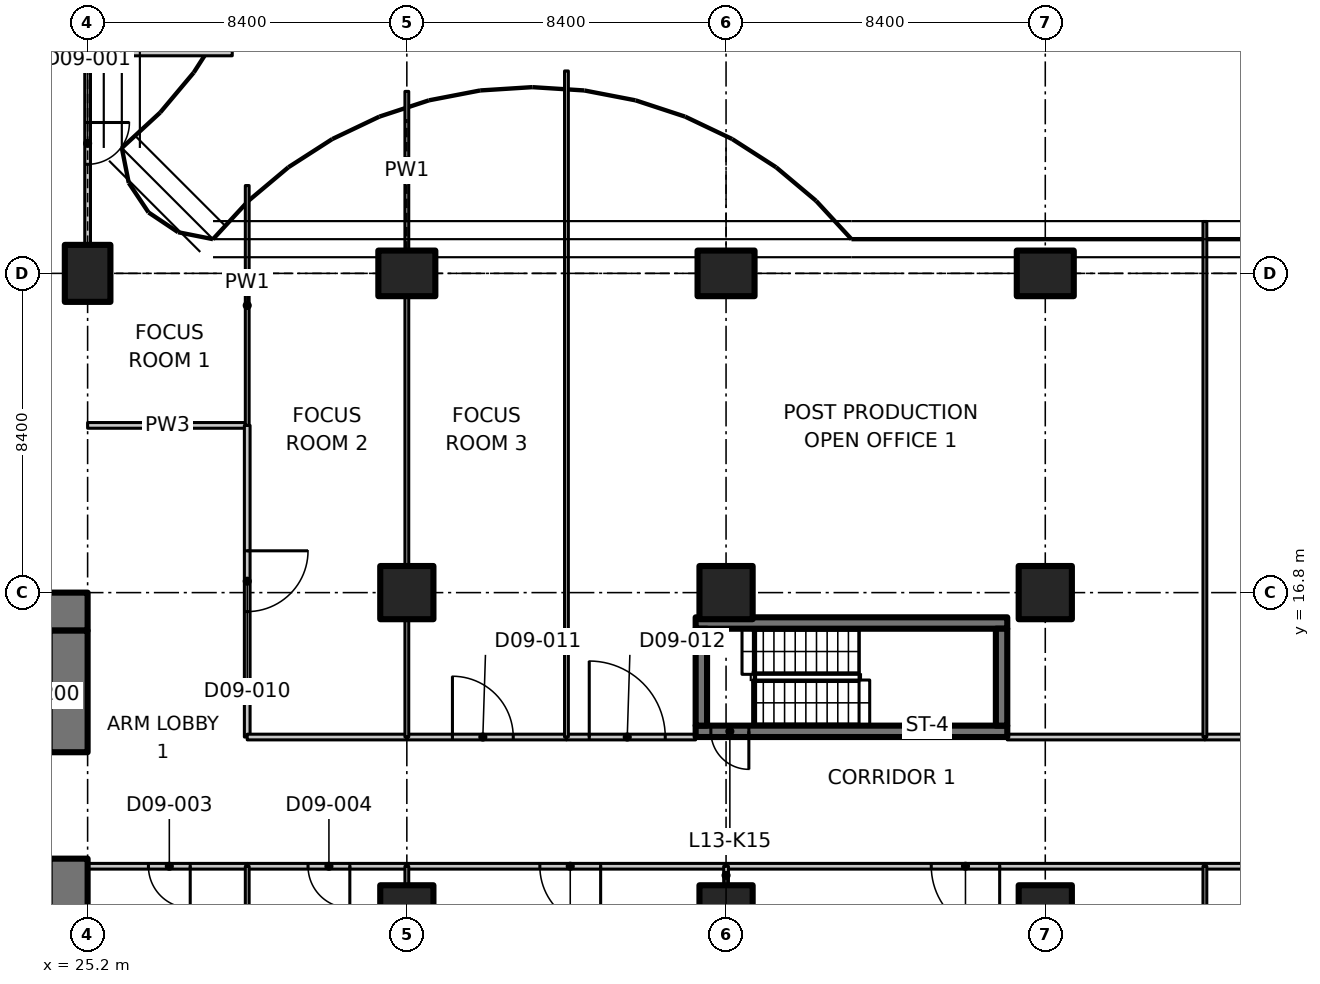
"""IFC4 building model, lengths in metres.
Left out: names, types, materials, properties, quantities, classifications, styles, units other than length and angle.
Written with IfcOpenShell. Run it as: python <this file> out.ifc"""

import sys

from ifc_helpers import new_model, si_unit, direction, frame, frame_2d, origin, origin_2d, place, context, subcontext, project, spatial, polyline, rectangle, outline, extrude, element, fill, save


model = new_model("IFC4")
c1 = context("Model", 3, precision=1e-05, world=origin(), true_north=direction((0.0, 1.0)))
c2 = subcontext(c1, "Body", "Model", "MODEL_VIEW")
j1 = project(units=[si_unit("LENGTHUNIT", "METRE"), si_unit("PLANEANGLEUNIT", "RADIAN")], contexts=[c1])
p1 = place(None, origin())
s1 = spatial("IfcSite", under=j1, at=p1, CompositionType="ELEMENT")
p2 = place(p1, origin())
s2 = spatial("IfcBuilding", under=s1, at=p2, CompositionType="ELEMENT")
p3 = place(p2, frame((0.0, 0.0, 61.7)))
s3 = spatial("IfcBuildingStorey", under=s2, at=p3, CompositionType="ELEMENT", Elevation=61.7)
p4 = place(p3, frame((25.2, 25.2, 0.0), z_axis=(0.0, 0.0, 1.0), x_axis=(1.0, 0.0, 0.0)))
e1 = element("IfcColumn", 1, at=p4, inside=s3, PredefinedType="COLUMN", context=c2, shape_type="SweptSolid", body=[
    extrude(rectangle(XDim=1.2, YDim=1.5, at=origin_2d()), origin(), (0.0, 0.0, 1.0), 3.35),
])
for number, where, z_axis, x_axis in (
    (2, (33.6, 8.4, 0.0), (0.0, 0.0, 1.0), (1.0, 0.0, 0.0)),
    (3, (33.6, 16.8, 0.0), (0.0, 0.0, 1.0), (1.0, 0.0, 0.0)),
):
    element("IfcColumn", number, at=place(p3, frame(where, z_axis=z_axis, x_axis=x_axis)), inside=s3, PredefinedType="COLUMN", context=c2, shape_type="SweptSolid", body=[
        extrude(rectangle(XDim=1.4, YDim=1.4, at=origin_2d()), origin(), (0.0, 0.0, 1.0), 3.35),
    ])
p5 = place(p3, frame((33.6, 25.2, 0.0), z_axis=(0.0, 0.0, 1.0), x_axis=(0.0, 1.0, 0.0)))
e4 = element("IfcColumn", 4, at=p5, inside=s3, PredefinedType="COLUMN", context=c2, shape_type="SweptSolid", body=[
    extrude(rectangle(XDim=1.2, YDim=1.5, at=origin_2d()), origin(), (0.0, 0.0, 1.0), 3.35),
])
for number, where, z_axis, x_axis in (
    (5, (42.0, 8.4, 0.0), (0.0, 0.0, 1.0), (1.0, 0.0, 0.0)),
    (6, (42.0, 16.8, 0.0), (0.0, 0.0, 1.0), (1.0, 0.0, 0.0)),
):
    element("IfcColumn", number, at=place(p3, frame(where, z_axis=z_axis, x_axis=x_axis)), inside=s3, PredefinedType="COLUMN", context=c2, shape_type="SweptSolid", body=[
        extrude(rectangle(XDim=1.4, YDim=1.4, at=origin_2d()), origin(), (0.0, 0.0, 1.0), 3.35),
    ])
p6 = place(p3, frame((42.0, 25.2, 0.0), z_axis=(0.0, 0.0, 1.0), x_axis=(0.0, 1.0, 0.0)))
e7 = element("IfcColumn", 7, at=p6, inside=s3, PredefinedType="COLUMN", context=c2, shape_type="SweptSolid", body=[
    extrude(rectangle(XDim=1.2, YDim=1.5, at=origin_2d()), origin(), (0.0, 0.0, 1.0), 3.35),
])
for number, where, z_axis, x_axis in (
    (8, (50.4, 8.4, 0.0), (0.0, 0.0, 1.0), (1.0, 0.0, 0.0)),
    (9, (50.4, 16.8, 0.0), (0.0, 0.0, 1.0), (1.0, 0.0, 0.0)),
):
    element("IfcColumn", number, at=place(p3, frame(where, z_axis=z_axis, x_axis=x_axis)), inside=s3, PredefinedType="COLUMN", context=c2, shape_type="SweptSolid", body=[
        extrude(rectangle(XDim=1.4, YDim=1.4, at=origin_2d()), origin(), (0.0, 0.0, 1.0), 3.35),
    ])
p7 = place(p3, frame((50.4, 25.2, 0.0), z_axis=(0.0, 0.0, 1.0), x_axis=(0.0, 1.0, 0.0)))
e10 = element("IfcColumn", 10, at=p7, inside=s3, PredefinedType="COLUMN", context=c2, shape_type="SweptSolid", body=[
    extrude(rectangle(XDim=1.2, YDim=1.5, at=origin_2d()), origin(), (0.0, 0.0, 1.0), 3.35),
])
p8 = place(p3, frame((23.8, 16.3, 0.0), z_axis=(0.0, 0.0, 1.0), x_axis=(1.0, 0.0, 0.0)))
e11 = element("IfcWall", 11, at=p8, inside=s3, PredefinedType="SHEAR", context=c2, shape_type="SweptSolid", body=[
    extrude(rectangle(XDim=1.4, YDim=1.0, at=frame_2d((0.7, 0.0))), origin(), (0.0, 0.0, 1.0), 3.35),
])
p9 = place(p3, frame((24.7, 1.0, 0.0), z_axis=(0.0, 0.0, 1.0), x_axis=(0.0, 1.0, 0.0)))
e12 = element("IfcWall", 12, at=p9, inside=s3, PredefinedType="SHEAR", context=c2, shape_type="SweptSolid", body=[
    extrude(rectangle(XDim=8.8, YDim=1.0, at=frame_2d((4.4, 0.0))), origin(), (0.0, 0.0, 1.0), 3.35),
])
p10 = place(p3, frame((24.7, 12.6, 0.0), z_axis=(0.0, 0.0, 1.0), x_axis=(0.0, 1.0, 0.0)))
e13 = element("IfcWall", 13, at=p10, inside=s3, PredefinedType="SHEAR", context=c2, shape_type="SweptSolid", body=[
    extrude(rectangle(XDim=3.2, YDim=1.0, at=frame_2d((1.6, 0.0))), origin(), (0.0, 0.0, 1.0), 3.35),
])
p11 = place(p3, frame((49.4, 13.15, 0.0), z_axis=(0.0, 0.0, 1.0), x_axis=(-1.0, 0.0, 0.0)))
e14 = element("IfcWall", 14, at=p11, inside=s3, PredefinedType="SHEAR", context=c2, shape_type="SweptSolid", body=[
    extrude(rectangle(XDim=8.2, YDim=0.3, at=frame_2d((4.1, 0.0))), origin(), (0.0, 0.0, 1.0), 3.35),
])
p12 = place(p11, frame((6.8, 0.0, 0.0)))
e15 = element("IfcOpeningElement", 15, at=p12, cuts=e14, PredefinedType="OPENING", context=c2, shape_type="SweptSolid", body=[
    extrude(rectangle(XDim=1.0, YDim=2.1, at=frame_2d((0.5, 1.05))), frame((0.0, 0.16, 0.0), z_axis=(0.0, -1.0, 0.0), x_axis=(1.0, 0.0, 0.0)), (0.0, 0.0, 1.0), 0.32),
])
p13 = place(p3, frame((41.2, 16.0, 0.0), z_axis=(0.0, 0.0, 1.0), x_axis=(1.0, 0.0, 0.0)))
e16 = element("IfcWall", 16, at=p13, inside=s3, PredefinedType="SHEAR", context=c2, shape_type="SweptSolid", body=[
    extrude(rectangle(XDim=8.2, YDim=0.3, at=frame_2d((4.1, 0.0))), origin(), (0.0, 0.0, 1.0), 3.35),
])
for number, where, z_axis, x_axis in (
    (17, (41.35, 13.3, 0.0), (0.0, 0.0, 1.0), (0.0, 1.0, 0.0)),
    (18, (49.25, 13.3, 0.0), (0.0, 0.0, 1.0), (0.0, 1.0, 0.0)),
):
    element("IfcWall", number, at=place(p3, frame(where, z_axis=z_axis, x_axis=x_axis)), inside=s3, PredefinedType="SHEAR", context=c2, shape_type="SweptSolid", body=[
        extrude(rectangle(XDim=2.55, YDim=0.3, at=frame_2d((1.275, 0.0))), origin(), (0.0, 0.0, 1.0), 3.35),
    ])
p14 = place(p3, frame((25.2, 21.2, 0.0), z_axis=(0.0, 0.0, 1.0), x_axis=(1.0, 0.0, 0.0)))
e19 = element("IfcWall", 19, at=p14, inside=s3, PredefinedType="PARTITIONING", context=c2, shape_type="SweptSolid", body=[
    extrude(rectangle(XDim=4.2, YDim=0.15, at=frame_2d((2.1, 0.0))), origin(), (0.0, 0.0, 1.0), 3.33),
])
p15 = place(p3, frame((29.4, 9.6, 0.0), z_axis=(0.0, 0.0, 1.0), x_axis=(-1.0, 0.0, 0.0)))
e20 = element("IfcWall", 20, at=p15, inside=s3, PredefinedType="PARTITIONING", context=c2, shape_type="SweptSolid", body=[
    extrude(rectangle(XDim=4.2, YDim=0.15, at=frame_2d((2.1, 0.0))), origin(), (0.0, 0.0, 1.0), 3.33),
])
p16 = place(p15, frame((1.5, 0.0, 0.0)))
e21 = element("IfcOpeningElement", 21, at=p16, cuts=e20, PredefinedType="OPENING", context=c2, shape_type="SweptSolid", body=[
    extrude(rectangle(XDim=1.1, YDim=2.1, at=frame_2d((0.55, 1.05))), frame((0.0, 0.085, 0.0), z_axis=(0.0, -1.0, 0.0), x_axis=(1.0, 0.0, 0.0)), (0.0, 0.0, 1.0), 0.17),
])
p17 = place(p3, frame((29.4, 21.2, 0.0), z_axis=(0.0, 0.0, 1.0), x_axis=(0.0, -1.0, 0.0)))
e22 = element("IfcWall", 22, at=p17, inside=s3, PredefinedType="PARTITIONING", context=c2, shape_type="SweptSolid", body=[
    extrude(rectangle(XDim=8.2, YDim=0.15, at=frame_2d((4.1, 0.0))), origin(), (0.0, 0.0, 1.0), 3.33),
])
p18 = place(p17, frame((3.3, 0.0, 0.0)))
e23 = element("IfcOpeningElement", 23, at=p18, cuts=e22, PredefinedType="OPENING", context=c2, shape_type="SweptSolid", body=[
    extrude(rectangle(XDim=1.6, YDim=2.1, at=frame_2d((0.8, 1.05))), frame((0.0, 0.085, 0.0), z_axis=(0.0, -1.0, 0.0), x_axis=(1.0, 0.0, 0.0)), (0.0, 0.0, 1.0), 0.17),
])
p19 = place(p3, frame((29.4, 27.511, 0.0), z_axis=(0.0, 0.0, 1.0), x_axis=(0.0, -1.0, 0.0)))
e24 = element("IfcWall", 24, at=p19, inside=s3, PredefinedType="PARTITIONING", context=c2, shape_type="SweptSolid", body=[
    extrude(outline(polyline([(0.0, 0.0), (6.311, 0.0), (6.311, 3.33), (2.761, 3.33), (2.759, 2.98), (1.863, 2.98), (1.861, 3.33), (0.236, 3.33), (0.0, 3.33), (0.0, 0.0)])), frame((0.0, 0.05, 0.0), z_axis=(0.0, -1.0, 0.0), x_axis=(1.0, 0.0, 0.0)), (0.0, 0.0, 1.0), 0.1),
])
p20 = place(p3, frame((25.2, 31.0, 0.0), z_axis=(0.0, 0.0, 1.0), x_axis=(0.0, -1.0, 0.0)))
e25 = element("IfcWall", 25, at=p20, inside=s3, PredefinedType="PARTITIONING", context=c2, shape_type="SweptSolid", body=[
    extrude(outline(polyline([(0.0, 0.0), (5.03, 0.0), (5.03, 2.98), (0.0, 2.98), (0.0, 0.0)])), frame((0.0, 0.075, 0.0), z_axis=(0.0, -1.0, 0.0), x_axis=(1.0, 0.0, 0.0)), (0.0, 0.0, 1.0), 0.15),
])
p21 = place(p20, frame((1.83, 0.0, 0.0)))
e26 = element("IfcOpeningElement", 26, at=p21, cuts=e25, PredefinedType="OPENING", context=c2, shape_type="SweptSolid", body=[
    extrude(rectangle(XDim=1.1, YDim=2.1, at=frame_2d((0.55, 1.05))), frame((0.0, 0.085, 0.0), z_axis=(0.0, -1.0, 0.0), x_axis=(1.0, 0.0, 0.0)), (0.0, 0.0, 1.0), 0.17),
])
p22 = place(p3, frame((25.2, 31.0, 0.0), z_axis=(0.0, 0.0, 1.0), x_axis=(1.0, 0.0, 0.0)))
e27 = element("IfcWall", 27, at=p22, inside=s3, PredefinedType="PARTITIONING", context=c2, shape_type="SweptSolid", body=[
    extrude(rectangle(XDim=3.806, YDim=0.15, at=frame_2d((1.903, 0.0))), origin(), (0.0, 0.0, 1.0), 2.98),
])
p23 = place(p3, frame((33.6, 9.6, 0.0), z_axis=(0.0, 0.0, 1.0), x_axis=(-1.0, 0.0, 0.0)))
e28 = element("IfcWall", 28, at=p23, inside=s3, PredefinedType="PARTITIONING", context=c2, shape_type="SweptSolid", body=[
    extrude(rectangle(XDim=4.2, YDim=0.15, at=frame_2d((2.1, 0.0))), origin(), (0.0, 0.0, 1.0), 3.33),
])
p24 = place(p23, frame((1.5, 0.0, 0.0)))
e29 = element("IfcOpeningElement", 29, at=p24, cuts=e28, PredefinedType="OPENING", context=c2, shape_type="SweptSolid", body=[
    extrude(rectangle(XDim=1.1, YDim=2.1, at=frame_2d((0.55, 1.05))), frame((0.0, 0.085, 0.0), z_axis=(0.0, -1.0, 0.0), x_axis=(1.0, 0.0, 0.0)), (0.0, 0.0, 1.0), 0.17),
])
p25 = place(p3, frame((42.0, 9.6, 0.0), z_axis=(0.0, 0.0, 1.0), x_axis=(-1.0, 0.0, 0.0)))
e30 = element("IfcWall", 30, at=p25, inside=s3, PredefinedType="PARTITIONING", context=c2, shape_type="SweptSolid", body=[
    extrude(rectangle(XDim=8.4, YDim=0.15, at=frame_2d((4.2, 0.0))), origin(), (0.0, 0.0, 1.0), 3.33),
])
p26 = place(p25, frame((3.3, 0.0, 0.0)))
e31 = element("IfcOpeningElement", 31, at=p26, cuts=e30, PredefinedType="OPENING", context=c2, shape_type="SweptSolid", body=[
    extrude(rectangle(XDim=1.6, YDim=2.1, at=frame_2d((0.8, 1.05))), frame((0.0, 0.085, 0.0), z_axis=(0.0, -1.0, 0.0), x_axis=(1.0, 0.0, 0.0)), (0.0, 0.0, 1.0), 0.17),
])
p27 = place(p3, frame((54.6, 9.6, 0.0), z_axis=(0.0, 0.0, 1.0), x_axis=(-1.0, 0.0, 0.0)))
e32 = element("IfcWall", 32, at=p27, inside=s3, PredefinedType="PARTITIONING", context=c2, shape_type="SweptSolid", body=[
    extrude(rectangle(XDim=12.6, YDim=0.15, at=frame_2d((6.3, 0.0))), origin(), (0.0, 0.0, 1.0), 3.33),
])
p28 = place(p27, frame((5.4, 0.0, 0.0)))
e33 = element("IfcOpeningElement", 33, at=p28, cuts=e32, PredefinedType="OPENING", context=c2, shape_type="SweptSolid", body=[
    extrude(rectangle(XDim=1.8, YDim=2.1, at=frame_2d((0.9, 1.05))), frame((0.0, 0.085, 0.0), z_axis=(0.0, -1.0, 0.0), x_axis=(1.0, 0.0, 0.0)), (0.0, 0.0, 1.0), 0.17),
])
p29 = place(p3, frame((58.8, 9.6, 0.0), z_axis=(0.0, 0.0, 1.0), x_axis=(-1.0, 0.0, 0.0)))
e34 = element("IfcWall", 34, at=p29, inside=s3, PredefinedType="PARTITIONING", context=c2, shape_type="SweptSolid", body=[
    extrude(rectangle(XDim=4.2, YDim=0.15, at=frame_2d((2.1, 0.0))), origin(), (0.0, 0.0, 1.0), 3.33),
])
p30 = place(p3, frame((29.4, 13.0, 0.0), z_axis=(0.0, 0.0, 1.0), x_axis=(1.0, 0.0, 0.0)))
e35 = element("IfcWall", 35, at=p30, inside=s3, PredefinedType="PARTITIONING", context=c2, shape_type="SweptSolid", body=[
    extrude(rectangle(XDim=4.2, YDim=0.15, at=frame_2d((2.1, 0.0))), origin(), (0.0, 0.0, 1.0), 3.33),
])
p31 = place(p3, frame((33.6, 13.0, 0.0), z_axis=(0.0, 0.0, 1.0), x_axis=(1.0, 0.0, 0.0)))
e36 = element("IfcWall", 36, at=p31, inside=s3, PredefinedType="PARTITIONING", context=c2, shape_type="SweptSolid", body=[
    extrude(rectangle(XDim=4.2, YDim=0.15, at=frame_2d((2.1, 0.0))), origin(), (0.0, 0.0, 1.0), 3.33),
])
p32 = place(p31, frame((1.2, 0.0, 0.0)))
e37 = element("IfcOpeningElement", 37, at=p32, cuts=e36, PredefinedType="OPENING", context=c2, shape_type="SweptSolid", body=[
    extrude(rectangle(XDim=1.6, YDim=2.1, at=frame_2d((0.8, 1.05))), frame((0.0, 0.085, 0.0), z_axis=(0.0, -1.0, 0.0), x_axis=(1.0, 0.0, 0.0)), (0.0, 0.0, 1.0), 0.17),
])
p33 = place(p3, frame((37.8, 13.0, 0.0), z_axis=(0.0, 0.0, 1.0), x_axis=(1.0, 0.0, 0.0)))
e38 = element("IfcWall", 38, at=p33, inside=s3, PredefinedType="PARTITIONING", context=c2, shape_type="SweptSolid", body=[
    extrude(rectangle(XDim=3.4, YDim=0.15, at=frame_2d((1.7, 0.0))), origin(), (0.0, 0.0, 1.0), 3.33),
])
p34 = place(p33, frame((0.6, 0.0, 0.0)))
e39 = element("IfcOpeningElement", 39, at=p34, cuts=e38, PredefinedType="OPENING", context=c2, shape_type="SweptSolid", body=[
    extrude(rectangle(XDim=2.0, YDim=2.4, at=frame_2d((1.0, 1.2))), frame((0.0, 0.085, 0.0), z_axis=(0.0, -1.0, 0.0), x_axis=(1.0, 0.0, 0.0)), (0.0, 0.0, 1.0), 0.17),
])
p35 = place(p3, frame((49.4, 13.0, 0.0), z_axis=(0.0, 0.0, 1.0), x_axis=(1.0, 0.0, 0.0)))
e40 = element("IfcWall", 40, at=p35, inside=s3, PredefinedType="PARTITIONING", context=c2, shape_type="SweptSolid", body=[
    extrude(rectangle(XDim=5.2, YDim=0.15, at=frame_2d((2.6, 0.0))), origin(), (0.0, 0.0, 1.0), 3.33),
])
p36 = place(p3, frame((54.6, 13.0, 0.0), z_axis=(0.0, 0.0, 1.0), x_axis=(1.0, 0.0, 0.0)))
e41 = element("IfcWall", 41, at=p36, inside=s3, PredefinedType="PARTITIONING", context=c2, shape_type="SweptSolid", body=[
    extrude(rectangle(XDim=8.4, YDim=0.15, at=frame_2d((4.2, 0.0))), origin(), (0.0, 0.0, 1.0), 3.33),
])
p37 = place(p36, frame((3.3, 0.0, 0.0)))
e42 = element("IfcOpeningElement", 42, at=p37, cuts=e41, PredefinedType="OPENING", context=c2, shape_type="SweptSolid", body=[
    extrude(rectangle(XDim=1.6, YDim=2.1, at=frame_2d((0.8, 1.05))), frame((0.0, 0.085, 0.0), z_axis=(0.0, -1.0, 0.0), x_axis=(1.0, 0.0, 0.0)), (0.0, 0.0, 1.0), 0.17),
])
p38 = place(p3, frame((29.4, 9.6, 0.0), z_axis=(0.0, 0.0, 1.0), x_axis=(0.0, -1.0, 0.0)))
e43 = element("IfcWall", 43, at=p38, inside=s3, PredefinedType="PARTITIONING", context=c2, shape_type="SweptSolid", body=[
    extrude(outline(polyline([(0.0, 0.0), (10.774, 0.0), (10.774, 3.33), (10.7, 3.33), (10.05, 3.33), (10.048, 2.98), (9.152, 2.98), (9.15, 3.33), (0.0, 3.33), (0.0, 0.0)])), frame((0.0, 0.05, 0.0), z_axis=(0.0, -1.0, 0.0), x_axis=(1.0, 0.0, 0.0)), (0.0, 0.0, 1.0), 0.1),
])
p39 = place(p3, frame((33.6, 9.6, 0.0), z_axis=(0.0, 0.0, 1.0), x_axis=(0.0, -1.0, 0.0)))
e44 = element("IfcWall", 44, at=p39, inside=s3, PredefinedType="PARTITIONING", context=c2, shape_type="SweptSolid", body=[
    extrude(rectangle(XDim=0.48, YDim=0.1, at=frame_2d((0.24, 0.0))), origin(), (0.0, 0.0, 1.0), 3.33),
])
p40 = place(p3, frame((42.0, 9.6, 0.0), z_axis=(0.0, 0.0, 1.0), x_axis=(0.0, -1.0, 0.0)))
e45 = element("IfcWall", 45, at=p40, inside=s3, PredefinedType="PARTITIONING", context=c2, shape_type="SweptSolid", body=[
    extrude(rectangle(XDim=0.48, YDim=0.125, at=frame_2d((0.24, 0.0))), origin(), (0.0, 0.0, 1.0), 3.33),
])
p41 = place(p3, frame((54.6, 9.6, 0.0), z_axis=(0.0, 0.0, 1.0), x_axis=(0.0, -1.0, 0.0)))
e46 = element("IfcWall", 46, at=p41, inside=s3, PredefinedType="PARTITIONING", context=c2, shape_type="SweptSolid", body=[
    extrude(rectangle(XDim=4.2, YDim=0.1, at=frame_2d((2.1, 0.0))), origin(), (0.0, 0.0, 1.0), 3.33),
])
p42 = place(p3, frame((33.6, 29.988, 0.0), z_axis=(0.0, 0.0, 1.0), x_axis=(0.0, -1.0, 0.0)))
e47 = element("IfcWall", 47, at=p42, inside=s3, PredefinedType="PARTITIONING", context=c2, shape_type="SweptSolid", body=[
    extrude(rectangle(XDim=4.168, YDim=0.1, at=frame_2d((2.084, 0.0))), origin(), (0.0, 0.0, 1.0), 2.98),
])
p43 = place(p3, frame((33.6, 24.58, 0.0), z_axis=(0.0, 0.0, 1.0), x_axis=(0.0, -1.0, 0.0)))
e48 = element("IfcWall", 48, at=p43, inside=s3, PredefinedType="PARTITIONING", context=c2, shape_type="SweptSolid", body=[
    extrude(rectangle(XDim=7.06, YDim=0.1, at=frame_2d((3.53, 0.0))), origin(), (0.0, 0.0, 1.0), 3.33),
])
p44 = place(p3, frame((33.6, 16.08, 0.0), z_axis=(0.0, 0.0, 1.0), x_axis=(0.0, -1.0, 0.0)))
e49 = element("IfcWall", 49, at=p44, inside=s3, PredefinedType="PARTITIONING", context=c2, shape_type="SweptSolid", body=[
    extrude(rectangle(XDim=3.08, YDim=0.1, at=frame_2d((1.54, 0.0))), origin(), (0.0, 0.0, 1.0), 3.33),
])
p45 = place(p3, frame((37.8, 30.526, 0.0), z_axis=(0.0, 0.0, 1.0), x_axis=(0.0, -1.0, 0.0)))
e50 = element("IfcWall", 50, at=p45, inside=s3, PredefinedType="PARTITIONING", context=c2, shape_type="SweptSolid", body=[
    extrude(outline(polyline([(0.0, 0.0), (17.526, 0.0), (17.526, 3.33), (5.776, 3.33), (5.774, 2.98), (4.878, 2.98), (4.876, 3.33), (0.283, 3.33), (0.0, 3.33), (0.0, 0.0)])), frame((0.0, 0.05, 0.0), z_axis=(0.0, -1.0, 0.0), x_axis=(1.0, 0.0, 0.0)), (0.0, 0.0, 1.0), 0.1),
])
p46 = place(p3, frame((54.6, 26.565, 0.0), z_axis=(0.0, 0.0, 1.0), x_axis=(0.0, -1.0, 0.0)))
e51 = element("IfcWall", 51, at=p46, inside=s3, PredefinedType="PARTITIONING", context=c2, shape_type="SweptSolid", body=[
    extrude(outline(polyline([(0.0, 0.0), (13.565, 0.0), (13.565, 3.33), (1.815, 3.33), (1.813, 2.98), (0.917, 2.98), (0.915, 3.33), (0.265, 3.33), (0.0, 3.33), (0.0, 0.0)])), frame((0.0, 0.05, 0.0), z_axis=(0.0, -1.0, 0.0), x_axis=(1.0, 0.0, 0.0)), (0.0, 0.0, 1.0), 0.1),
])
p47 = place(p12, origin())
e52 = element("IfcDoor", 52, at=p47, inside=s3, OperationType="SINGLE_SWING_RIGHT", PredefinedType="DOOR", context=c2, shape_type="SweptSolid", body=[
    extrude(rectangle(XDim=1.0, YDim=2.1, at=frame_2d((0.5, 1.05))), frame((0.0, 0.025, 0.0), z_axis=(0.0, -1.0, 0.0), x_axis=(1.0, 0.0, 0.0)), (0.0, 0.0, 1.0), 0.05),
])
fill(e15, e52)
p48 = place(p21, origin())
e53 = element("IfcDoor", 53, at=p48, inside=s3, OperationType="SINGLE_SWING_RIGHT", PredefinedType="DOOR", context=c2, shape_type="SweptSolid", body=[
    extrude(rectangle(XDim=1.1, YDim=2.1, at=frame_2d((0.55, 1.05))), frame((0.0, 0.025, 0.0), z_axis=(0.0, -1.0, 0.0), x_axis=(1.0, 0.0, 0.0)), (0.0, 0.0, 1.0), 0.05),
])
fill(e26, e53)
p49 = place(p16, origin())
e54 = element("IfcDoor", 54, at=p49, inside=s3, OperationType="SINGLE_SWING_LEFT", PredefinedType="DOOR", context=c2, shape_type="SweptSolid", body=[
    extrude(rectangle(XDim=1.1, YDim=2.1, at=frame_2d((0.55, 1.05))), frame((0.0, 0.025, 0.0), z_axis=(0.0, -1.0, 0.0), x_axis=(1.0, 0.0, 0.0)), (0.0, 0.0, 1.0), 0.05),
])
fill(e21, e54)
p50 = place(p24, origin())
e55 = element("IfcDoor", 55, at=p50, inside=s3, OperationType="SINGLE_SWING_LEFT", PredefinedType="DOOR", context=c2, shape_type="SweptSolid", body=[
    extrude(rectangle(XDim=1.1, YDim=2.1, at=frame_2d((0.55, 1.05))), frame((0.0, 0.025, 0.0), z_axis=(0.0, -1.0, 0.0), x_axis=(1.0, 0.0, 0.0)), (0.0, 0.0, 1.0), 0.05),
])
fill(e29, e55)
p51 = place(p26, origin())
e56 = element("IfcDoor", 56, at=p51, inside=s3, OperationType="DOUBLE_DOOR_SINGLE_SWING", PredefinedType="DOOR", context=c2, shape_type="SweptSolid", body=[
    extrude(rectangle(XDim=1.6, YDim=2.1, at=frame_2d((0.8, 1.05))), frame((0.0, 0.025, 0.0), z_axis=(0.0, -1.0, 0.0), x_axis=(1.0, 0.0, 0.0)), (0.0, 0.0, 1.0), 0.05),
])
fill(e31, e56)
p52 = place(p28, origin())
e57 = element("IfcDoor", 57, at=p52, inside=s3, OperationType="DOUBLE_DOOR_SINGLE_SWING", PredefinedType="DOOR", context=c2, shape_type="SweptSolid", body=[
    extrude(rectangle(XDim=1.8, YDim=2.1, at=frame_2d((0.9, 1.05))), frame((0.0, 0.025, 0.0), z_axis=(0.0, -1.0, 0.0), x_axis=(1.0, 0.0, 0.0)), (0.0, 0.0, 1.0), 0.05),
])
fill(e33, e57)
p53 = place(p18, origin())
e58 = element("IfcDoor", 58, at=p53, inside=s3, OperationType="DOUBLE_DOOR_SINGLE_SWING", PredefinedType="DOOR", context=c2, shape_type="SweptSolid", body=[
    extrude(rectangle(XDim=1.6, YDim=2.1, at=frame_2d((0.8, 1.05))), frame((0.0, 0.025, 0.0), z_axis=(0.0, -1.0, 0.0), x_axis=(1.0, 0.0, 0.0)), (0.0, 0.0, 1.0), 0.05),
])
fill(e23, e58)
p54 = place(p32, origin())
e59 = element("IfcDoor", 59, at=p54, inside=s3, OperationType="DOUBLE_DOOR_SINGLE_SWING", PredefinedType="DOOR", context=c2, shape_type="SweptSolid", body=[
    extrude(rectangle(XDim=1.6, YDim=2.1, at=frame_2d((0.8, 1.05))), frame((0.0, 0.025, 0.0), z_axis=(0.0, -1.0, 0.0), x_axis=(1.0, 0.0, 0.0)), (0.0, 0.0, 1.0), 0.05),
])
fill(e37, e59)
p55 = place(p34, origin())
e60 = element("IfcDoor", 60, at=p55, inside=s3, OperationType="DOUBLE_DOOR_SINGLE_SWING", PredefinedType="DOOR", context=c2, shape_type="SweptSolid", body=[
    extrude(rectangle(XDim=2.0, YDim=2.4, at=frame_2d((1.0, 1.2))), frame((0.0, 0.025, 0.0), z_axis=(0.0, -1.0, 0.0), x_axis=(1.0, 0.0, 0.0)), (0.0, 0.0, 1.0), 0.05),
])
fill(e39, e60)
save(model, sys.argv[1])
